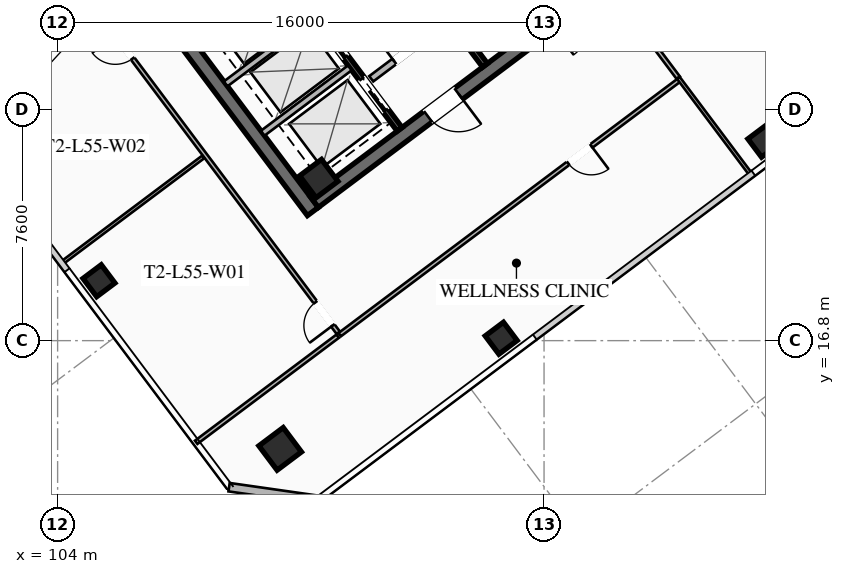
"""IFC4 building model, lengths in metres.
Left out: names, types, materials, properties, quantities, classifications, styles, units other than length and angle.
Written with IfcOpenShell. Run it as: python <this file> out.ifc"""

import sys

from ifc_helpers import new_model, si_unit, direction, frame, frame_2d, origin, origin_2d, place, context, subcontext, project, spatial, rectangle, hollow_rectangle, extrude, element, fill, save


model = new_model("IFC4")
c1 = context("Model", 3, precision=1e-05, world=origin(), true_north=direction((0.0, 1.0)))
c2 = subcontext(c1, "Body", "Model", "MODEL_VIEW")
j1 = project(units=[si_unit("LENGTHUNIT", "METRE"), si_unit("PLANEANGLEUNIT", "RADIAN")], contexts=[c1])
p1 = place(None, origin())
s1 = spatial("IfcSite", under=j1, at=p1, CompositionType="ELEMENT")
p2 = place(p1, origin())
s2 = spatial("IfcBuilding", under=s1, at=p2, CompositionType="ELEMENT")
p3 = place(p2, frame((0.0, 0.0, 204.2)))
s3 = spatial("IfcBuildingStorey", under=s2, at=p3, CompositionType="ELEMENT", Elevation=204.2)
p4 = place(p3, frame((112.396, 21.047, 0.0), z_axis=(0.0, 0.0, 1.0), x_axis=(-0.600005007985, 0.799996243986, 0.0)))
e1 = element("IfcWall", 1, at=p4, inside=s3, PredefinedType="SHEAR", context=c2, shape_type="SweptSolid", body=[
    extrude(rectangle(XDim=15.6, YDim=0.45, at=frame_2d((7.8, 0.0))), origin(), (0.0, 0.0, 1.0), 3.55),
])
p5 = place(p3, frame((124.649, 30.518, 0.0), z_axis=(0.0, 0.0, 1.0), x_axis=(-0.8, -0.6, 0.0)))
e2 = element("IfcWall", 2, at=p5, inside=s3, PredefinedType="SHEAR", context=c2, shape_type="SweptSolid", body=[
    extrude(rectangle(XDim=15.26, YDim=0.45, at=frame_2d((7.63, 0.0))), origin(), (0.0, 0.0, 1.0), 3.55),
])
p6 = place(p5, frame((9.33, 0.0, 0.0)))
e3 = element("IfcOpeningElement", 3, at=p6, cuts=e2, PredefinedType="OPENING", context=c2, shape_type="SweptSolid", body=[
    extrude(rectangle(XDim=1.25, YDim=2.25, at=frame_2d((0.625, 1.125))), frame((0.0, 0.235, 0.0), z_axis=(0.0, -1.0, 0.0), x_axis=(1.0, 0.0, 0.0)), (0.0, 0.0, 1.0), 0.47),
])
p7 = place(p5, frame((4.28, 0.0, 0.0)))
e4 = element("IfcOpeningElement", 4, at=p7, cuts=e2, PredefinedType="OPENING", context=c2, shape_type="SweptSolid", body=[
    extrude(rectangle(XDim=1.25, YDim=2.25, at=frame_2d((0.625, 1.125))), frame((0.0, 0.235, 0.0), z_axis=(0.0, -1.0, 0.0), x_axis=(1.0, 0.0, 0.0)), (0.0, 0.0, 1.0), 0.47),
])
p8 = place(p3, frame((112.59, 22.13, 0.0), z_axis=(0.0, 0.0, 1.0), x_axis=(0.799999996291, 0.600000004945, 0.0)))
e5 = element("IfcColumn", 5, at=p8, inside=s3, PredefinedType="COLUMN", context=c2, shape_type="SweptSolid", body=[
    extrude(hollow_rectangle(XDim=0.9, YDim=0.9, WallThickness=0.04, at=origin_2d()), origin(), (0.0, 0.0, 1.0), 3.37),
])
p9 = place(p3, frame((111.32, 13.24, 0.0), z_axis=(0.0, 0.0, 1.0), x_axis=(0.799999996291, 0.600000004945, 0.0)))
e6 = element("IfcColumn", 6, at=p9, inside=s3, PredefinedType="COLUMN", context=c2, shape_type="SweptSolid", body=[
    extrude(hollow_rectangle(XDim=1.0, YDim=1.0, WallThickness=0.04, at=origin_2d()), origin(), (0.0, 0.0, 1.0), 3.37),
])
for number, where, z_axis, x_axis in (
    (7, (118.59, 16.88, 0.0), (0.0, 0.0, 1.0), (0.8, 0.6, 0.0)),
    (8, (127.23, 23.36, 0.0), (0.0, 0.0, 1.0), (0.8, 0.6, 0.0)),
    (9, (105.36, 18.77, 0.0), (0.0, 0.0, 1.0), (0.8, 0.6, 0.0)),
):
    element("IfcColumn", number, at=place(p3, frame(where, z_axis=z_axis, x_axis=x_axis)), inside=s3, PredefinedType="COLUMN", context=c2, shape_type="SweptSolid", body=[
        extrude(hollow_rectangle(XDim=0.75, YDim=0.75, WallThickness=0.032, at=origin_2d()), origin(), (0.0, 0.0, 1.0), 3.37),
    ])
p10 = place(p3, frame((112.58, 11.56, 0.0), z_axis=(0.0, 0.0, 1.0), x_axis=(-0.989954425158, 0.14138683146, 0.0)))
e10 = element("IfcWall", 10, at=p10, inside=s3, PredefinedType="SOLIDWALL", context=c2, shape_type="SweptSolid", body=[
    extrude(rectangle(XDim=2.97, YDim=0.28, at=frame_2d((1.485, 0.0))), origin(), (0.0, 0.0, 1.0), 3.37),
])
p11 = place(p3, frame((118.058, 25.856, 0.0), z_axis=(0.0, 0.0, 1.0), x_axis=(-0.600002657301, 0.799998007018, 0.0)))
e11 = element("IfcWall", 11, at=p11, inside=s3, PredefinedType="SHEAR", context=c2, shape_type="SweptSolid", body=[
    extrude(rectangle(XDim=14.7, YDim=0.2, at=frame_2d((7.35, 0.0))), origin(), (0.0, 0.0, 1.0), 3.37),
])
p12 = place(p3, frame((114.316, 25.412, 0.0), z_axis=(0.0, 0.0, 1.0), x_axis=(0.800018601094, 0.59997519774, 0.0)))
e12 = element("IfcWall", 12, at=p12, inside=s3, PredefinedType="SOLIDWALL", context=c2, shape_type="SweptSolid", body=[
    extrude(rectangle(XDim=3.15, YDim=0.22, at=frame_2d((1.575, 0.0))), origin(), (0.0, 0.0, 1.0), 2.723),
])
p13 = place(p12, frame((0.95, 0.0, 0.0)))
e13 = element("IfcOpeningElement", 13, at=p13, cuts=e12, PredefinedType="OPENING", context=c2, shape_type="SweptSolid", body=[
    extrude(rectangle(XDim=1.25, YDim=2.25, at=frame_2d((0.625, 1.125))), frame((0.0, 0.12, 0.0), z_axis=(0.0, -1.0, 0.0), x_axis=(1.0, 0.0, 0.0)), (0.0, 0.0, 1.0), 0.24),
])
p14 = place(p3, frame((115.25, 23.75, 0.0), z_axis=(0.0, 0.0, 1.0), x_axis=(-0.599994036198, 0.800004472816, 0.0)))
e14 = element("IfcWall", 14, at=p14, inside=s3, PredefinedType="SHEAR", context=c2, shape_type="SweptSolid", body=[
    extrude(rectangle(XDim=6.55, YDim=0.2, at=frame_2d((3.275, 0.0))), origin(), (0.0, 0.0, 1.0), 3.37),
])
p15 = place(p14, frame((4.975, 0.0, 0.0)))
e15 = element("IfcOpeningElement", 15, at=p15, cuts=e14, PredefinedType="OPENING", context=c2, shape_type="SweptSolid", body=[
    extrude(rectangle(XDim=1.3, YDim=2.25, at=frame_2d((0.65, 1.125))), frame((0.0, 0.11, 0.0), z_axis=(0.0, -1.0, 0.0), x_axis=(1.0, 0.0, 0.0)), (0.0, 0.0, 1.0), 0.22),
])
p16 = place(p14, frame((2.975, 0.0, 0.0)))
e16 = element("IfcOpeningElement", 16, at=p16, cuts=e14, PredefinedType="OPENING", context=c2, shape_type="SweptSolid", body=[
    extrude(rectangle(XDim=1.3, YDim=2.25, at=frame_2d((0.65, 1.125))), frame((0.0, 0.11, 0.0), z_axis=(0.0, -1.0, 0.0), x_axis=(1.0, 0.0, 0.0)), (0.0, 0.0, 1.0), 0.22),
])
p17 = place(p14, frame((0.775, 0.0, 0.0)))
e17 = element("IfcOpeningElement", 17, at=p17, cuts=e14, PredefinedType="OPENING", context=c2, shape_type="SweptSolid", body=[
    extrude(rectangle(XDim=1.3, YDim=2.25, at=frame_2d((0.65, 1.125))), frame((0.0, 0.11, 0.0), z_axis=(0.0, -1.0, 0.0), x_axis=(1.0, 0.0, 0.0)), (0.0, 0.0, 1.0), 0.22),
])
for number, where, z_axis, x_axis in (
    (18, (110.746, 23.622, 0.0), (0.0, 0.0, 1.0), (0.8, 0.6, 0.0)),
    (19, (109.528, 25.246, 0.0), (0.0, 0.0, 1.0), (0.8, 0.6, 0.0)),
):
    element("IfcWall", number, at=place(p3, frame(where, z_axis=z_axis, x_axis=x_axis)), inside=s3, PredefinedType="SOLIDWALL", context=c2, shape_type="SweptSolid", body=[
        extrude(rectangle(XDim=3.58, YDim=0.2, at=frame_2d((1.79, 0.0))), origin(), (0.0, 0.0, 1.0), 3.37),
    ])
p18 = place(p3, frame((124.462, 25.384, 0.0), z_axis=(0.0, 0.0, 1.0), x_axis=(-0.799997904343, -0.6000027942, 0.0)))
e20 = element("IfcWall", 20, at=p18, inside=s3, PredefinedType="PARTITIONING", context=c2, shape_type="SweptSolid", body=[
    extrude(rectangle(XDim=13.98, YDim=0.135, at=frame_2d((6.99, 0.0))), origin(), (0.0, 0.0, 1.0), 2.723),
])
p19 = place(p18, frame((3.635, 0.0, 0.0)))
e21 = element("IfcOpeningElement", 21, at=p19, cuts=e20, PredefinedType="OPENING", context=c2, shape_type="SweptSolid", body=[
    extrude(rectangle(XDim=0.95, YDim=2.05, at=frame_2d((0.475, 1.025))), frame((0.0, 0.077, 0.0), z_axis=(0.0, -1.0, 0.0), x_axis=(1.0, 0.0, 0.0)), (0.0, 0.0, 1.0), 0.155),
])
p20 = place(p3, frame((122.248, 28.336, 0.0), z_axis=(0.0, 0.0, 1.0), x_axis=(0.600010820699, -0.799991884361, 0.0)))
e22 = element("IfcWall", 22, at=p20, inside=s3, PredefinedType="PARTITIONING", context=c2, shape_type="SweptSolid", body=[
    extrude(rectangle(XDim=3.61, YDim=0.135, at=frame_2d((1.805, 0.0))), origin(), (0.0, 0.0, 1.0), 2.723),
])
p21 = place(p20, frame((0.25, 0.0, 0.0)))
e23 = element("IfcOpeningElement", 23, at=p21, cuts=e22, PredefinedType="OPENING", context=c2, shape_type="SweptSolid", body=[
    extrude(rectangle(XDim=0.95, YDim=2.05, at=frame_2d((0.475, 1.025))), frame((0.0, 0.077, 0.0), z_axis=(0.0, -1.0, 0.0), x_axis=(1.0, 0.0, 0.0)), (0.0, 0.0, 1.0), 0.155),
])
p22 = place(p3, frame((126.808, 22.256, 0.0), z_axis=(0.0, 0.0, 1.0), x_axis=(-0.600019580308, 0.799985314394, 0.0)))
e24 = element("IfcWall", 24, at=p22, inside=s3, PredefinedType="PARTITIONING", context=c2, shape_type="SweptSolid", body=[
    extrude(rectangle(XDim=3.99, YDim=0.11, at=frame_2d((1.995, 0.0))), origin(), (0.0, 0.0, 1.0), 2.723),
])
p23 = place(p3, frame((113.23, 17.06, 0.0), z_axis=(0.0, 0.0, 1.0), x_axis=(-0.600003772342, 0.79999717073, 0.0)))
e25 = element("IfcWall", 25, at=p23, inside=s3, PredefinedType="PARTITIONING", context=c2, shape_type="SweptSolid", body=[
    extrude(rectangle(XDim=20.71, YDim=0.135, at=frame_2d((10.355, 0.0))), origin(), (0.0, 0.0, 1.0), 2.723),
])
p24 = place(p23, frame((0.3, 0.0, 0.0)))
e26 = element("IfcOpeningElement", 26, at=p24, cuts=e25, PredefinedType="OPENING", context=c2, shape_type="SweptSolid", body=[
    extrude(rectangle(XDim=0.95, YDim=2.05, at=frame_2d((0.475, 1.025))), frame((0.0, 0.077, 0.0), z_axis=(0.0, -1.0, 0.0), x_axis=(1.0, 0.0, 0.0)), (0.0, 0.0, 1.0), 0.155),
])
p25 = place(p23, frame((11.272, 0.0, 0.0)))
e27 = element("IfcOpeningElement", 27, at=p25, cuts=e25, PredefinedType="OPENING", context=c2, shape_type="SweptSolid", body=[
    extrude(rectangle(XDim=0.95, YDim=2.05, at=frame_2d((0.475, 1.025))), frame((0.0, 0.077, 0.0), z_axis=(0.0, -1.0, 0.0), x_axis=(1.0, 0.0, 0.0)), (0.0, 0.0, 1.0), 0.155),
])
p26 = place(p23, frame((19.46, 0.0, 0.0)))
e28 = element("IfcOpeningElement", 28, at=p26, cuts=e25, PredefinedType="OPENING", context=c2, shape_type="SweptSolid", body=[
    extrude(rectangle(XDim=0.95, YDim=2.05, at=frame_2d((0.475, 1.025))), frame((0.0, 0.077, 0.0), z_axis=(0.0, -1.0, 0.0), x_axis=(1.0, 0.0, 0.0)), (0.0, 0.0, 1.0), 0.155),
])
p27 = place(p3, frame((108.558, 13.456, 0.0), z_axis=(0.0, 0.0, 1.0), x_axis=(0.800005033825, 0.599993288175, 0.0)))
e29 = element("IfcWall", 29, at=p27, inside=s3, PredefinedType="PARTITIONING", context=c2, shape_type="SweptSolid", body=[
    extrude(rectangle(XDim=5.82, YDim=0.135, at=frame_2d((2.91, 0.0))), origin(), (0.0, 0.0, 1.0), 2.723),
])
p28 = place(p3, frame((104.136, 19.352, 0.0), z_axis=(0.0, 0.0, 1.0), x_axis=(0.800005033825, 0.599993288175, 0.0)))
e30 = element("IfcWall", 30, at=p28, inside=s3, PredefinedType="PARTITIONING", context=c2, shape_type="SweptSolid", body=[
    extrude(rectangle(XDim=5.82, YDim=0.11, at=frame_2d((2.91, 0.0))), origin(), (0.0, 0.0, 1.0), 2.723),
])
p29 = place(p6, origin())
e31 = element("IfcDoor", 31, at=p29, inside=s3, OperationType="SINGLE_SWING_LEFT", PredefinedType="DOOR", context=c2, shape_type="SweptSolid", body=[
    extrude(rectangle(XDim=1.25, YDim=2.25, at=frame_2d((0.625, 1.125))), frame((0.0, 0.025, 0.0), z_axis=(0.0, -1.0, 0.0), x_axis=(1.0, 0.0, 0.0)), (0.0, 0.0, 1.0), 0.05),
])
fill(e3, e31)
p30 = place(p13, origin())
e32 = element("IfcDoor", 32, at=p30, inside=s3, OperationType="SINGLE_SWING_LEFT", PredefinedType="DOOR", context=c2, shape_type="SweptSolid", body=[
    extrude(rectangle(XDim=1.25, YDim=2.25, at=frame_2d((0.625, 1.125))), frame((0.0, 0.025, 0.0), z_axis=(0.0, -1.0, 0.0), x_axis=(1.0, 0.0, 0.0)), (0.0, 0.0, 1.0), 0.05),
])
fill(e13, e32)
p31 = place(p19, origin())
e33 = element("IfcDoor", 33, at=p31, inside=s3, OperationType="SINGLE_SWING_LEFT", PredefinedType="DOOR", context=c2, shape_type="SweptSolid", body=[
    extrude(rectangle(XDim=0.95, YDim=2.05, at=frame_2d((0.475, 1.025))), frame((0.0, 0.025, 0.0), z_axis=(0.0, -1.0, 0.0), x_axis=(1.0, 0.0, 0.0)), (0.0, 0.0, 1.0), 0.05),
])
fill(e21, e33)
p32 = place(p24, origin())
e34 = element("IfcDoor", 34, at=p32, inside=s3, OperationType="SINGLE_SWING_LEFT", PredefinedType="DOOR", context=c2, shape_type="SweptSolid", body=[
    extrude(rectangle(XDim=0.95, YDim=2.05, at=frame_2d((0.475, 1.025))), frame((0.0, 0.025, 0.0), z_axis=(0.0, -1.0, 0.0), x_axis=(1.0, 0.0, 0.0)), (0.0, 0.0, 1.0), 0.05),
])
fill(e26, e34)
p33 = place(p25, origin())
e35 = element("IfcDoor", 35, at=p33, inside=s3, OperationType="SINGLE_SWING_RIGHT", PredefinedType="DOOR", context=c2, shape_type="SweptSolid", body=[
    extrude(rectangle(XDim=0.95, YDim=2.05, at=frame_2d((0.475, 1.025))), frame((0.0, 0.025, 0.0), z_axis=(0.0, -1.0, 0.0), x_axis=(1.0, 0.0, 0.0)), (0.0, 0.0, 1.0), 0.05),
])
fill(e27, e35)
p34 = place(p16, origin())
e36 = element("IfcDoor", 36, at=p34, inside=s3, OperationType="SLIDING_TO_LEFT", PredefinedType="DOOR", context=c2, shape_type="SweptSolid", body=[
    extrude(rectangle(XDim=1.3, YDim=2.25, at=frame_2d((0.65, 1.125))), frame((0.0, 0.025, 0.0), z_axis=(0.0, -1.0, 0.0), x_axis=(1.0, 0.0, 0.0)), (0.0, 0.0, 1.0), 0.05),
])
fill(e16, e36)
p35 = place(p17, origin())
e37 = element("IfcDoor", 37, at=p35, inside=s3, OperationType="SLIDING_TO_LEFT", PredefinedType="DOOR", context=c2, shape_type="SweptSolid", body=[
    extrude(rectangle(XDim=1.3, YDim=2.25, at=frame_2d((0.65, 1.125))), frame((0.0, 0.025, 0.0), z_axis=(0.0, -1.0, 0.0), x_axis=(1.0, 0.0, 0.0)), (0.0, 0.0, 1.0), 0.05),
])
fill(e17, e37)
save(model, sys.argv[1])
